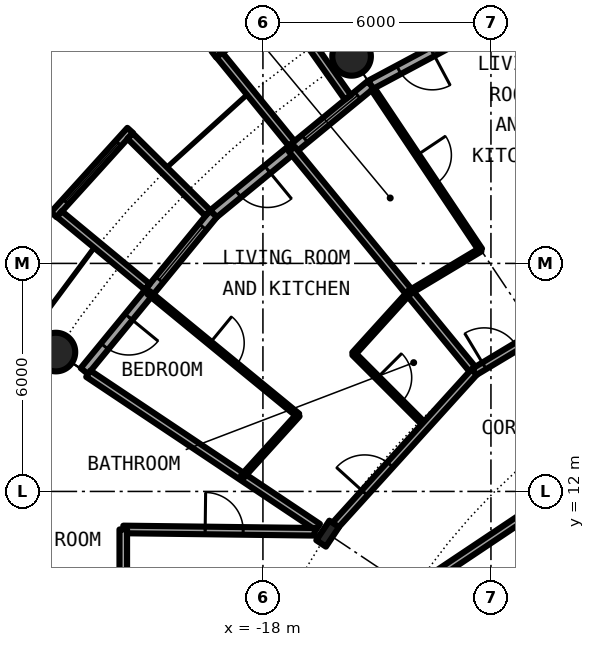
"""IFC4 building model, lengths in metres.
Left out: names, types, materials, properties, quantities, classifications, styles, units other than length and angle.
Written with IfcOpenShell. Run it as: python <this file> out.ifc"""

import sys

from ifc_helpers import new_model, si_unit, direction, frame, frame_2d, origin, origin_2d, place, context, subcontext, project, spatial, rectangle, circle, hollow_circle, i_section, extrude, element, fill, save


model = new_model("IFC4")
c1 = context("Model", 3, precision=1e-05, world=origin(), true_north=direction((0.0, 1.0)))
c2 = subcontext(c1, "Body", "Model", "MODEL_VIEW")
j1 = project(units=[si_unit("LENGTHUNIT", "METRE"), si_unit("PLANEANGLEUNIT", "RADIAN")], contexts=[c1])
p1 = place(None, origin())
s1 = spatial("IfcSite", under=j1, at=p1, CompositionType="ELEMENT")
p2 = place(p1, origin())
s2 = spatial("IfcBuilding", under=s1, at=p2, CompositionType="ELEMENT")
p3 = place(p2, frame((0.0, 0.0, 28.9)))
s3 = spatial("IfcBuildingStorey", under=s2, at=p3, CompositionType="ELEMENT", Elevation=28.9)
for number, where, z_axis, x_axis in (
    (1, (-15.667, 23.448, 0.0), (0.0, 0.0, 1.0), (1.0, 0.0, 0.0)),
    (2, (-23.448, 15.667, 0.0), (0.0, 0.0, 1.0), (1.0, 0.0, 0.0)),
):
    element("IfcColumn", number, at=place(p3, frame(where, z_axis=z_axis, x_axis=x_axis)), inside=s3, PredefinedType="COLUMN", context=c2, shape_type="SweptSolid", body=[
        extrude(hollow_circle(Radius=0.508, WallThickness=0.05, at=origin_2d()), origin(), (0.0, 0.0, 1.0), 3.05),
    ])
p4 = place(p3, frame((-16.297, 10.889, 0.0), z_axis=(0.0, 0.0, 1.0), x_axis=(-0.831469612303, 0.55557023302, 0.0)))
e3 = element("IfcColumn", 3, at=p4, inside=s3, PredefinedType="COLUMN", context=c2, shape_type="SweptSolid", body=[
    extrude(i_section(OverallWidth=0.305, OverallDepth=0.62, WebThickness=0.021, FlangeThickness=0.04, FilletRadius=0.027, at=origin_2d()), origin(), (0.0, 0.0, 1.0), 3.05),
])
p5 = place(p3, frame((-10.447, 25.222, 0.0), z_axis=(0.0, 0.0, 1.0), x_axis=(-0.881915646801, -0.471407246368, 0.0)))
e4 = element("IfcWall", 4, at=p5, inside=s3, PredefinedType="SOLIDWALL", context=c2, shape_type="SweptSolid", body=[
    extrude(rectangle(XDim=5.352, YDim=0.25, at=frame_2d((2.676, 0.0))), origin(), (0.0, 0.0, 1.0), 2.7),
])
p6 = place(p5, frame((0.441, 0.0, 0.3)))
e5 = element("IfcOpeningElement", 5, at=p6, cuts=e4, PredefinedType="OPENING", context=c2, shape_type="SweptSolid", body=[
    extrude(rectangle(XDim=1.8, YDim=2.1, at=frame_2d((0.9, 1.05))), frame((0.0, 0.135, 0.0), z_axis=(0.0, -1.0, 0.0), x_axis=(1.0, 0.0, 0.0)), (0.0, 0.0, 1.0), 0.27),
])
p7 = place(p5, frame((3.51, 0.0, 0.0)))
e6 = element("IfcOpeningElement", 6, at=p7, cuts=e4, PredefinedType="OPENING", context=c2, shape_type="SweptSolid", body=[
    extrude(rectangle(XDim=1.0, YDim=2.2, at=frame_2d((0.5, 1.1))), frame((0.0, 0.135, 0.0), z_axis=(0.0, -1.0, 0.0), x_axis=(1.0, 0.0, 0.0)), (0.0, 0.0, 1.0), 0.27),
])
p8 = place(p3, frame((-15.167, 22.699, 0.0), z_axis=(0.0, 0.0, 1.0), x_axis=(-0.773019449054, -0.634382322723, 0.0)))
e7 = element("IfcWall", 7, at=p8, inside=s3, PredefinedType="SOLIDWALL", context=c2, shape_type="SweptSolid", body=[
    extrude(rectangle(XDim=5.352, YDim=0.25, at=frame_2d((2.676, 0.0))), origin(), (0.0, 0.0, 1.0), 2.7),
])
p9 = place(p8, frame((0.441, 0.0, 0.3)))
e8 = element("IfcOpeningElement", 8, at=p9, cuts=e7, PredefinedType="OPENING", context=c2, shape_type="SweptSolid", body=[
    extrude(rectangle(XDim=1.8, YDim=2.1, at=frame_2d((0.9, 1.05))), frame((0.0, 0.135, 0.0), z_axis=(0.0, -1.0, 0.0), x_axis=(1.0, 0.0, 0.0)), (0.0, 0.0, 1.0), 0.27),
])
p10 = place(p8, frame((3.51, 0.0, 0.0)))
e9 = element("IfcOpeningElement", 9, at=p10, cuts=e7, PredefinedType="OPENING", context=c2, shape_type="SweptSolid", body=[
    extrude(rectangle(XDim=1.0, YDim=2.2, at=frame_2d((0.5, 1.1))), frame((0.0, 0.135, 0.0), z_axis=(0.0, -1.0, 0.0), x_axis=(1.0, 0.0, 0.0)), (0.0, 0.0, 1.0), 0.27),
])
p11 = place(p3, frame((-17.427, 24.909, -0.03), z_axis=(0.0, 0.0, 1.0), x_axis=(-0.796842165306, -0.60418752353, 0.0)))
e10 = element("IfcWall", 10, at=p11, inside=s3, PredefinedType="SOLIDWALL", context=c2, shape_type="SweptSolid", body=[
    extrude(rectangle(XDim=2.337, YDim=0.2, at=frame_2d((1.168, 0.0))), origin(), (0.0, 0.0, 1.0), 2.73),
])
p12 = place(p11, frame((0.128, 0.0, 0.33)))
e11 = element("IfcOpeningElement", 11, at=p12, cuts=e10, PredefinedType="OPENING", context=c2, shape_type="SweptSolid", body=[
    extrude(circle(Radius=1.04, at=frame_2d((1.04, 1.04))), frame((0.0, 0.11, 0.0), z_axis=(0.0, -1.0, 0.0), x_axis=(1.0, 0.0, 0.0)), (0.0, 0.0, 1.0), 0.22),
])
p13 = place(p3, frame((-15.765, 22.37, -0.03), z_axis=(0.0, 0.0, 1.0), x_axis=(-0.576274612209, 0.817256123454, 0.0)))
e12 = element("IfcWall", 12, at=p13, inside=s3, PredefinedType="SOLIDWALL", context=c2, shape_type="SweptSolid", body=[
    extrude(rectangle(XDim=2.933, YDim=0.2, at=frame_2d((1.466, 0.0))), origin(), (0.0, 0.0, 1.0), 2.73),
])
p14 = place(p3, frame((-17.246, 21.155, -0.03), z_axis=(0.0, 0.0, 1.0), x_axis=(-0.631741648902, 0.775179004516, 0.0)))
e13 = element("IfcWall", 13, at=p14, inside=s3, PredefinedType="SOLIDWALL", context=c2, shape_type="SweptSolid", body=[
    extrude(rectangle(XDim=3.006, YDim=0.2, at=frame_2d((1.503, 0.0))), origin(), (0.0, 0.0, 1.0), 2.73),
])
p15 = place(p3, frame((-19.304, 19.304, 0.0), z_axis=(0.0, 0.0, 1.0), x_axis=(-0.634382322723, -0.773019449054, 0.0)))
e14 = element("IfcWall", 14, at=p15, inside=s3, PredefinedType="SOLIDWALL", context=c2, shape_type="SweptSolid", body=[
    extrude(rectangle(XDim=5.352, YDim=0.25, at=frame_2d((2.676, 0.0))), origin(), (0.0, 0.0, 1.0), 2.7),
])
p16 = place(p15, frame((0.441, 0.0, 0.3)))
e15 = element("IfcOpeningElement", 15, at=p16, cuts=e14, PredefinedType="OPENING", context=c2, shape_type="SweptSolid", body=[
    extrude(rectangle(XDim=1.8, YDim=2.1, at=frame_2d((0.9, 1.05))), frame((0.0, 0.135, 0.0), z_axis=(0.0, -1.0, 0.0), x_axis=(1.0, 0.0, 0.0)), (0.0, 0.0, 1.0), 0.27),
])
p17 = place(p15, frame((3.51, 0.0, 0.0)))
e16 = element("IfcOpeningElement", 16, at=p17, cuts=e14, PredefinedType="OPENING", context=c2, shape_type="SweptSolid", body=[
    extrude(rectangle(XDim=1.0, YDim=2.2, at=frame_2d((0.5, 1.1))), frame((0.0, 0.135, 0.0), z_axis=(0.0, -1.0, 0.0), x_axis=(1.0, 0.0, 0.0)), (0.0, 0.0, 1.0), 0.27),
])
p18 = place(p3, frame((-21.493, 21.5, -0.03), z_axis=(0.0, 0.0, 1.0), x_axis=(-0.671506829416, -0.740998365753, 0.0)))
e17 = element("IfcWall", 17, at=p18, inside=s3, PredefinedType="SOLIDWALL", context=c2, shape_type="SweptSolid", body=[
    extrude(rectangle(XDim=2.993, YDim=0.2, at=frame_2d((1.497, 0.0))), origin(), (0.0, 0.0, 1.0), 2.73),
])
p19 = place(p18, frame((0.457, 0.0, 0.33)))
e18 = element("IfcOpeningElement", 18, at=p19, cuts=e17, PredefinedType="OPENING", context=c2, shape_type="SweptSolid", body=[
    extrude(circle(Radius=1.04, at=frame_2d((1.04, 1.04))), frame((0.0, 0.11, 0.0), z_axis=(0.0, -1.0, 0.0), x_axis=(1.0, 0.0, 0.0)), (0.0, 0.0, 1.0), 0.22),
])
p20 = place(p3, frame((-19.45, 19.323, -0.03), z_axis=(0.0, 0.0, 1.0), x_axis=(-0.709727076896, 0.704476739375, 0.0)))
e19 = element("IfcWall", 19, at=p20, inside=s3, PredefinedType="SOLIDWALL", context=c2, shape_type="SweptSolid", body=[
    extrude(rectangle(XDim=2.883, YDim=0.2, at=frame_2d((1.441, 0.0))), origin(), (0.0, 0.0, 1.0), 2.73),
])
p21 = place(p3, frame((-21.041, 17.384, -0.03), z_axis=(0.0, 0.0, 1.0), x_axis=(-0.770784861449, 0.63709551667, 0.0)))
e20 = element("IfcWall", 20, at=p21, inside=s3, PredefinedType="SOLIDWALL", context=c2, shape_type="SweptSolid", body=[
    extrude(rectangle(XDim=3.006, YDim=0.2, at=frame_2d((1.503, 0.0))), origin(), (0.0, 0.0, 1.0), 2.73),
])
p22 = place(p3, frame((-22.595, 15.097, 0.0), z_axis=(0.0, 0.0, 1.0), x_axis=(0.831465568067, -0.555576285599, 0.0)))
e21 = element("IfcWall", 21, at=p22, inside=s3, PredefinedType="PARTITIONING", context=c2, shape_type="SweptSolid", body=[
    extrude(rectangle(XDim=7.264, YDim=0.2, at=frame_2d((3.632, 0.0))), origin(), (0.0, 0.0, 1.0), 2.7),
])
p23 = place(p3, frame((-21.012, 17.233, 0.0), z_axis=(0.0, 0.0, 1.0), x_axis=(0.77326214499, -0.634086472908, 0.0)))
e22 = element("IfcWall", 22, at=p23, inside=s3, PredefinedType="PARTITIONING", context=c2, shape_type="SweptSolid", body=[
    extrude(rectangle(XDim=5.089, YDim=0.1, at=frame_2d((2.544, 0.0))), origin(), (0.0, 0.0, 1.0), 2.7),
])
p24 = place(p23, frame((2.094, 0.0, 0.0)))
e23 = element("IfcOpeningElement", 23, at=p24, cuts=e22, PredefinedType="OPENING", context=c2, shape_type="SweptSolid", body=[
    extrude(rectangle(XDim=0.9, YDim=2.3, at=frame_2d((0.45, 1.15))), frame((0.0, 0.06, 0.0), z_axis=(0.0, -1.0, 0.0), x_axis=(1.0, 0.0, 0.0)), (0.0, 0.0, 1.0), 0.12),
])
p25 = place(p3, frame((-17.24, 21.007, 0.0), z_axis=(0.0, 0.0, 1.0), x_axis=(0.634381303318, -0.773020285633, 0.0)))
e24 = element("IfcWall", 24, at=p25, inside=s3, PredefinedType="PARTITIONING", context=c2, shape_type="SweptSolid", body=[
    extrude(rectangle(XDim=7.576, YDim=0.2, at=frame_2d((3.788, 0.0))), origin(), (0.0, 0.0, 1.0), 2.7),
])
p26 = place(p3, frame((-15.612, 15.622, 0.0), z_axis=(0.0, 0.0, 1.0), x_axis=(0.706741540154, -0.707471833659, 0.0)))
e25 = element("IfcWall", 25, at=p26, inside=s3, PredefinedType="PARTITIONING", context=c2, shape_type="SweptSolid", body=[
    extrude(rectangle(XDim=2.674, YDim=0.1, at=frame_2d((1.337, 0.0))), origin(), (0.0, 0.0, 1.0), 2.7),
])
p27 = place(p26, frame((0.887, 0.0, 0.0)))
e26 = element("IfcOpeningElement", 26, at=p27, cuts=e25, PredefinedType="OPENING", context=c2, shape_type="SweptSolid", body=[
    extrude(rectangle(XDim=0.9, YDim=2.3, at=frame_2d((0.45, 1.15))), frame((0.0, 0.06, 0.0), z_axis=(0.0, -1.0, 0.0), x_axis=(1.0, 0.0, 0.0)), (0.0, 0.0, 1.0), 0.12),
])
p28 = place(p3, frame((-15.105, 22.59, 0.0), z_axis=(0.0, 0.0, 1.0), x_axis=(0.555939561221, -0.831222716406, 0.0)))
e27 = element("IfcWall", 27, at=p28, inside=s3, PredefinedType="PARTITIONING", context=c2, shape_type="SweptSolid", body=[
    extrude(rectangle(XDim=5.089, YDim=0.1, at=frame_2d((2.544, 0.0))), origin(), (0.0, 0.0, 1.0), 2.7),
])
p29 = place(p28, frame((2.094, 0.0, 0.0)))
e28 = element("IfcOpeningElement", 28, at=p29, cuts=e27, PredefinedType="OPENING", context=c2, shape_type="SweptSolid", body=[
    extrude(rectangle(XDim=0.9, YDim=2.3, at=frame_2d((0.45, 1.15))), frame((0.0, 0.06, 0.0), z_axis=(0.0, -1.0, 0.0), x_axis=(1.0, 0.0, 0.0)), (0.0, 0.0, 1.0), 0.12),
])
p30 = place(p3, frame((-21.675, 11.0, 0.0), z_axis=(0.0, 0.0, 1.0), x_axis=(0.99992425795, -0.012307654658, 0.0)))
e29 = element("IfcWall", 29, at=p30, inside=s3, PredefinedType="PARTITIONING", context=c2, shape_type="SweptSolid", body=[
    extrude(rectangle(XDim=5.039, YDim=0.2, at=frame_2d((2.519, 0.0))), origin(), (0.0, 0.0, 1.0), 2.7),
])
p31 = place(p30, frame((2.155, 0.0, 0.0)))
e30 = element("IfcOpeningElement", 30, at=p31, cuts=e29, PredefinedType="OPENING", context=c2, shape_type="SweptSolid", body=[
    extrude(rectangle(XDim=1.0, YDim=2.3, at=frame_2d((0.5, 1.15))), frame((0.0, 0.11, 0.0), z_axis=(0.0, -1.0, 0.0), x_axis=(1.0, 0.0, 0.0)), (0.0, 0.0, 1.0), 0.22),
])
p32 = place(p3, frame((-14.039, 9.396, 0.0), z_axis=(0.0, 0.0, 1.0), x_axis=(0.831348689697, 0.555751163866, 0.0)))
e31 = element("IfcWall", 31, at=p32, inside=s3, PredefinedType="PARTITIONING", context=c2, shape_type="SweptSolid", body=[
    extrude(rectangle(XDim=12.914, YDim=0.2, at=frame_2d((6.457, 0.0))), origin(), (0.0, 0.0, 1.0), 2.7),
])
p33 = place(p32, frame((7.568, 0.0, 0.0)))
e32 = element("IfcOpeningElement", 32, at=p33, cuts=e31, PredefinedType="OPENING", context=c2, shape_type="SweptSolid", body=[
    extrude(rectangle(XDim=1.0, YDim=2.3, at=frame_2d((0.5, 1.15))), frame((0.0, 0.11, 0.0), z_axis=(0.0, -1.0, 0.0), x_axis=(1.0, 0.0, 0.0)), (0.0, 0.0, 1.0), 0.22),
])
p34 = place(p3, frame((-16.193, 11.003, 0.0), z_axis=(0.0, 0.0, 1.0), x_axis=(0.671514934772, 0.740991020444, 0.0)))
e33 = element("IfcWall", 33, at=p34, inside=s3, PredefinedType="PARTITIONING", context=c2, shape_type="SweptSolid", body=[
    extrude(rectangle(XDim=5.598, YDim=0.2, at=frame_2d((2.799, 0.0))), origin(), (0.0, 0.0, 1.0), 2.38),
])
p35 = place(p34, frame((1.293, 0.0, 0.0)))
e34 = element("IfcOpeningElement", 34, at=p35, cuts=e33, PredefinedType="OPENING", context=c2, shape_type="SweptSolid", body=[
    extrude(rectangle(XDim=1.0, YDim=2.3, at=frame_2d((0.5, 1.15))), frame((0.0, 0.11, 0.0), z_axis=(0.0, -1.0, 0.0), x_axis=(1.0, 0.0, 0.0)), (0.0, 0.0, 1.0), 0.22),
])
p36 = place(p3, frame((-12.439, 15.146, 0.0), z_axis=(0.0, 0.0, 1.0), x_axis=(0.857323214505, 0.514778501757, 0.0)))
e35 = element("IfcWall", 35, at=p36, inside=s3, PredefinedType="PARTITIONING", context=c2, shape_type="SweptSolid", body=[
    extrude(rectangle(XDim=1.778, YDim=0.2, at=frame_2d((0.889, 0.0))), origin(), (0.0, 0.0, 1.0), 2.38),
])
p37 = place(p36, frame((0.307, 0.0, 0.0)))
e36 = element("IfcOpeningElement", 36, at=p37, cuts=e35, PredefinedType="OPENING", context=c2, shape_type="SweptSolid", body=[
    extrude(rectangle(XDim=1.0, YDim=2.3, at=frame_2d((0.5, 1.15))), frame((0.0, 0.11, 0.0), z_axis=(0.0, -1.0, 0.0), x_axis=(1.0, 0.0, 0.0)), (0.0, 0.0, 1.0), 0.22),
])
p38 = place(p3, frame((-21.675, 9.4, 0.0), z_axis=(0.0, 0.0, 1.0), x_axis=(0.0, 1.0, 0.0)))
e37 = element("IfcWall", 37, at=p38, inside=s3, PredefinedType="PARTITIONING", context=c2, shape_type="SweptSolid", body=[
    extrude(rectangle(XDim=1.6, YDim=0.2, at=frame_2d((0.8, 0.0))), origin(), (0.0, 0.0, 1.0), 2.7),
])
for number, where, z_axis, x_axis in (
    (38, (-18.538, 12.394, 0.0), (0.0, 0.0, 1.0), (0.672, 0.741, 0.0)),
    (39, (-15.613, 15.621, 0.0), (0.0, 0.0, 1.0), (0.672, 0.741, 0.0)),
):
    element("IfcWall", number, at=place(p3, frame(where, z_axis=z_axis, x_axis=x_axis)), inside=s3, PredefinedType="PARTITIONING", context=c2, shape_type="SweptSolid", body=[
        extrude(rectangle(XDim=2.183, YDim=0.1, at=frame_2d((1.091, 0.0))), origin(), (0.0, 0.0, 1.0), 2.7),
    ])
p39 = place(p3, frame((-14.147, 17.237, 0.0), z_axis=(0.0, 0.0, 1.0), x_axis=(0.857660741648, 0.514215958752, 0.0)))
e40 = element("IfcWall", 40, at=p39, inside=s3, PredefinedType="PARTITIONING", context=c2, shape_type="SweptSolid", body=[
    extrude(rectangle(XDim=2.182, YDim=0.1, at=frame_2d((1.091, 0.0))), origin(), (0.0, 0.0, 1.0), 2.7),
])
p40 = place(p7, origin())
e41 = element("IfcDoor", 41, at=p40, inside=s3, OperationType="SINGLE_SWING_LEFT", PredefinedType="DOOR", context=c2, shape_type="SweptSolid", body=[
    extrude(rectangle(XDim=1.0, YDim=2.2, at=frame_2d((0.5, 1.1))), frame((0.0, 0.025, 0.0), z_axis=(0.0, -1.0, 0.0), x_axis=(1.0, 0.0, 0.0)), (0.0, 0.0, 1.0), 0.05),
])
fill(e6, e41)
p41 = place(p9, origin())
e42 = element("IfcWindow", 42, at=p41, inside=s3, PartitioningType="SINGLE_PANEL", PredefinedType="WINDOW", context=c2, shape_type="SweptSolid", body=[
    extrude(rectangle(XDim=1.8, YDim=2.1, at=frame_2d((0.9, 1.05))), frame((0.0, 0.03, 0.0), z_axis=(0.0, -1.0, 0.0), x_axis=(1.0, 0.0, 0.0)), (0.0, 0.0, 1.0), 0.06),
])
fill(e8, e42)
p42 = place(p12, origin())
e43 = element("IfcWindow", 43, at=p42, inside=s3, PartitioningType="SINGLE_PANEL", PredefinedType="WINDOW", context=c2, shape_type="SweptSolid", body=[
    extrude(circle(Radius=1.04, at=frame_2d((1.04, 1.04))), frame((0.0, 0.03, 0.0), z_axis=(0.0, -1.0, 0.0), x_axis=(1.0, 0.0, 0.0)), (0.0, 0.0, 1.0), 0.06),
])
fill(e11, e43)
p43 = place(p10, origin())
e44 = element("IfcDoor", 44, at=p43, inside=s3, OperationType="SINGLE_SWING_LEFT", PredefinedType="DOOR", context=c2, shape_type="SweptSolid", body=[
    extrude(rectangle(XDim=1.0, YDim=2.2, at=frame_2d((0.5, 1.1))), frame((0.0, 0.025, 0.0), z_axis=(0.0, -1.0, 0.0), x_axis=(1.0, 0.0, 0.0)), (0.0, 0.0, 1.0), 0.05),
])
fill(e9, e44)
p44 = place(p16, origin())
e45 = element("IfcWindow", 45, at=p44, inside=s3, PartitioningType="SINGLE_PANEL", PredefinedType="WINDOW", context=c2, shape_type="SweptSolid", body=[
    extrude(rectangle(XDim=1.8, YDim=2.1, at=frame_2d((0.9, 1.05))), frame((0.0, 0.03, 0.0), z_axis=(0.0, -1.0, 0.0), x_axis=(1.0, 0.0, 0.0)), (0.0, 0.0, 1.0), 0.06),
])
fill(e15, e45)
p45 = place(p19, origin())
e46 = element("IfcWindow", 46, at=p45, inside=s3, PartitioningType="SINGLE_PANEL", PredefinedType="WINDOW", context=c2, shape_type="SweptSolid", body=[
    extrude(circle(Radius=1.04, at=frame_2d((1.04, 1.04))), frame((0.0, 0.03, 0.0), z_axis=(0.0, -1.0, 0.0), x_axis=(1.0, 0.0, 0.0)), (0.0, 0.0, 1.0), 0.06),
])
fill(e18, e46)
p46 = place(p17, origin())
e47 = element("IfcDoor", 47, at=p46, inside=s3, OperationType="SINGLE_SWING_LEFT", PredefinedType="DOOR", context=c2, shape_type="SweptSolid", body=[
    extrude(rectangle(XDim=1.0, YDim=2.2, at=frame_2d((0.5, 1.1))), frame((0.0, 0.025, 0.0), z_axis=(0.0, -1.0, 0.0), x_axis=(1.0, 0.0, 0.0)), (0.0, 0.0, 1.0), 0.05),
])
fill(e16, e47)
p47 = place(p37, origin())
e48 = element("IfcDoor", 48, at=p47, inside=s3, OperationType="SINGLE_SWING_LEFT", PredefinedType="DOOR", context=c2, shape_type="SweptSolid", body=[
    extrude(rectangle(XDim=1.0, YDim=2.3, at=frame_2d((0.5, 1.15))), frame((0.0, 0.025, 0.0), z_axis=(0.0, -1.0, 0.0), x_axis=(1.0, 0.0, 0.0)), (0.0, 0.0, 1.0), 0.05),
])
fill(e36, e48)
p48 = place(p29, origin())
e49 = element("IfcDoor", 49, at=p48, inside=s3, OperationType="SINGLE_SWING_RIGHT", PredefinedType="DOOR", context=c2, shape_type="SweptSolid", body=[
    extrude(rectangle(XDim=0.9, YDim=2.3, at=frame_2d((0.45, 1.15))), frame((0.0, 0.025, 0.0), z_axis=(0.0, -1.0, 0.0), x_axis=(1.0, 0.0, 0.0)), (0.0, 0.0, 1.0), 0.05),
])
fill(e28, e49)
p49 = place(p35, origin())
e50 = element("IfcDoor", 50, at=p49, inside=s3, OperationType="SINGLE_SWING_LEFT", PredefinedType="DOOR", context=c2, shape_type="SweptSolid", body=[
    extrude(rectangle(XDim=1.0, YDim=2.3, at=frame_2d((0.5, 1.15))), frame((0.0, 0.025, 0.0), z_axis=(0.0, -1.0, 0.0), x_axis=(1.0, 0.0, 0.0)), (0.0, 0.0, 1.0), 0.05),
])
fill(e34, e50)
p50 = place(p27, origin())
e51 = element("IfcDoor", 51, at=p50, inside=s3, OperationType="SINGLE_SWING_RIGHT", PredefinedType="DOOR", context=c2, shape_type="SweptSolid", body=[
    extrude(rectangle(XDim=0.9, YDim=2.3, at=frame_2d((0.45, 1.15))), frame((0.0, 0.025, 0.0), z_axis=(0.0, -1.0, 0.0), x_axis=(1.0, 0.0, 0.0)), (0.0, 0.0, 1.0), 0.05),
])
fill(e26, e51)
p51 = place(p24, origin())
e52 = element("IfcDoor", 52, at=p51, inside=s3, OperationType="SINGLE_SWING_RIGHT", PredefinedType="DOOR", context=c2, shape_type="SweptSolid", body=[
    extrude(rectangle(XDim=0.9, YDim=2.3, at=frame_2d((0.45, 1.15))), frame((0.0, 0.025, 0.0), z_axis=(0.0, -1.0, 0.0), x_axis=(1.0, 0.0, 0.0)), (0.0, 0.0, 1.0), 0.05),
])
fill(e23, e52)
p52 = place(p31, origin())
e53 = element("IfcDoor", 53, at=p52, inside=s3, OperationType="SINGLE_SWING_RIGHT", PredefinedType="DOOR", context=c2, shape_type="SweptSolid", body=[
    extrude(rectangle(XDim=1.0, YDim=2.3, at=frame_2d((0.5, 1.15))), frame((0.0, 0.025, 0.0), z_axis=(0.0, -1.0, 0.0), x_axis=(1.0, 0.0, 0.0)), (0.0, 0.0, 1.0), 0.05),
])
fill(e30, e53)
save(model, sys.argv[1])
